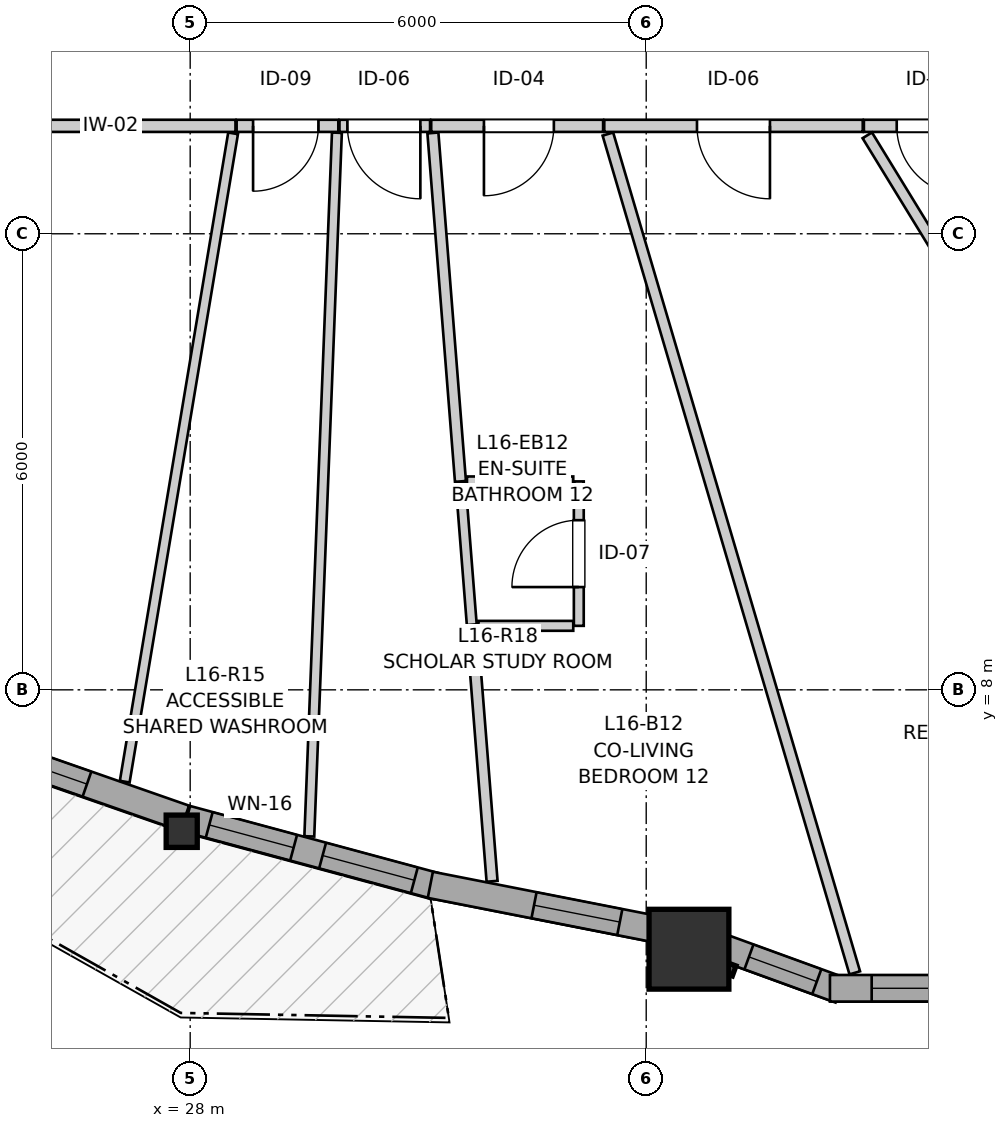
"""IFC4 building model, lengths in metres.
Left out: names, types, materials, properties, quantities, classifications, styles, units other than length and angle.
Written with IfcOpenShell. Run it as: python <this file> out.ifc"""

import sys

from ifc_helpers import new_model, si_unit, direction, frame, frame_2d, origin, origin_2d, place, context, subcontext, project, spatial, rectangle, i_section, extrude, source, transform, mapped, element, fill, save


model = new_model("IFC4")
c1 = context("Model", 3, precision=1e-05, world=origin(), true_north=direction((0.0, 1.0)))
c2 = subcontext(c1, "Body", "Model", "MODEL_VIEW")
j1 = project(units=[si_unit("LENGTHUNIT", "METRE"), si_unit("PLANEANGLEUNIT", "RADIAN")], contexts=[c1])
p1 = place(None, origin())
s1 = spatial("IfcSite", under=j1, at=p1, CompositionType="ELEMENT")
p2 = place(p1, origin())
s2 = spatial("IfcBuilding", under=s1, at=p2, CompositionType="ELEMENT")
p3 = place(p2, frame((0.0, 0.0, 55.8)))
s3 = spatial("IfcBuildingStorey", under=s2, at=p3, CompositionType="ELEMENT", Elevation=55.8)
m1 = source(origin(), c2, "Body", "SweptSolid", [
    extrude(i_section(OverallWidth=0.409, OverallDepth=0.425, WebThickness=0.03, FlangeThickness=0.048, FilletRadius=0.015, at=origin_2d()), origin(), (0.0, 0.0, 1.0), 2.94),
])
p4 = place(p3, frame((27.888, 6.139, 0.0), z_axis=(0.0, 0.0, 1.0), x_axis=(1.0, 0.0, 0.0)))
e1 = element("IfcColumn", 1, at=p4, inside=s3, PredefinedType="PILASTER", context=c2, shape_type="MappedRepresentation", body=[
    mapped(m1, transform((0.0, 0.0, 0.0), x_axis=(1.0, 0.0, 0.0), y_axis=(0.0, 1.0, 0.0), z_axis=(0.0, 0.0, 1.0), scale=1.0)),
])
m2 = source(origin(), c2, "Body", "SweptSolid", [
    extrude(rectangle(XDim=1.05, YDim=1.05, at=origin_2d()), origin(), (0.0, 0.0, 1.0), 2.94),
])
p5 = place(p3, frame((34.562, 4.587, 0.0), z_axis=(0.0, 0.0, 1.0), x_axis=(1.0, 0.0, 0.0)))
e2 = element("IfcColumn", 2, at=p5, inside=s3, PredefinedType="COLUMN", context=c2, shape_type="MappedRepresentation", body=[
    mapped(m2, transform((0.0, 0.0, 0.0), x_axis=(1.0, 0.0, 0.0), y_axis=(0.0, 1.0, 0.0), z_axis=(0.0, 0.0, 1.0), scale=1.0)),
])
p6 = place(p3, frame((24.76, 7.417, 0.0), z_axis=(0.0, 0.0, 1.0), x_axis=(0.944134890247, -0.329559264804, 0.0)))
e3 = element("IfcWall", 3, at=p6, inside=s3, PredefinedType="SOLIDWALL", context=c2, shape_type="SweptSolid", body=[
    extrude(rectangle(XDim=3.354, YDim=0.35, at=frame_2d((1.677, 0.0))), origin(), (0.0, 0.0, 1.0), 2.42),
])
p7 = place(p6, frame((0.543, 0.0, 0.82)))
e4 = element("IfcOpeningElement", 4, at=p7, cuts=e3, PredefinedType="OPENING", context=c2, shape_type="SweptSolid", body=[
    extrude(rectangle(XDim=1.45, YDim=1.25, at=frame_2d((0.725, 0.625))), frame((0.0, 0.185, 0.0), z_axis=(0.0, -1.0, 0.0), x_axis=(1.0, 0.0, 0.0)), (0.0, 0.0, 1.0), 0.37),
])
p8 = place(p3, frame((27.953, 6.303, 0.0), z_axis=(0.0, 0.0, 1.0), x_axis=(0.965464207527, -0.260535724968, 0.0)))
e5 = element("IfcWall", 5, at=p8, inside=s3, PredefinedType="SOLIDWALL", context=c2, shape_type="SweptSolid", body=[
    extrude(rectangle(XDim=3.41, YDim=0.35, at=frame_2d((1.705, 0.0))), origin(), (0.0, 0.0, 1.0), 2.42),
])
p9 = place(p8, frame((0.308, 0.0, 0.82)))
e6 = element("IfcOpeningElement", 6, at=p9, cuts=e5, PredefinedType="OPENING", context=c2, shape_type="SweptSolid", body=[
    extrude(rectangle(XDim=1.15, YDim=1.2, at=frame_2d((0.575, 0.6))), frame((0.0, 0.185, 0.0), z_axis=(0.0, -1.0, 0.0), x_axis=(1.0, 0.0, 0.0)), (0.0, 0.0, 1.0), 0.37),
])
p10 = place(p8, frame((1.853, 0.0, 0.82)))
e7 = element("IfcOpeningElement", 7, at=p10, cuts=e5, PredefinedType="OPENING", context=c2, shape_type="SweptSolid", body=[
    extrude(rectangle(XDim=1.25, YDim=1.35, at=frame_2d((0.625, 0.675))), frame((0.0, 0.185, 0.0), z_axis=(0.0, -1.0, 0.0), x_axis=(1.0, 0.0, 0.0)), (0.0, 0.0, 1.0), 0.37),
])
p11 = place(p3, frame((31.16, 5.435, 0.0), z_axis=(0.0, 0.0, 1.0), x_axis=(0.981237747431, -0.192801667567, 0.0)))
e8 = element("IfcWall", 8, at=p11, inside=s3, PredefinedType="SOLIDWALL", context=c2, shape_type="SweptSolid", body=[
    extrude(rectangle(XDim=3.202, YDim=0.35, at=frame_2d((1.601, 0.0))), origin(), (0.0, 0.0, 1.0), 2.42),
])
p12 = place(p11, frame((1.39, 0.0, 0.82)))
e9 = element("IfcOpeningElement", 9, at=p12, cuts=e8, PredefinedType="OPENING", context=c2, shape_type="SweptSolid", body=[
    extrude(rectangle(XDim=1.15, YDim=1.2, at=frame_2d((0.575, 0.6))), frame((0.0, 0.185, 0.0), z_axis=(0.0, -1.0, 0.0), x_axis=(1.0, 0.0, 0.0)), (0.0, 0.0, 1.0), 0.37),
])
p13 = place(p3, frame((34.904, 4.649, 0.0), z_axis=(0.0, 0.0, 1.0), x_axis=(0.939675390388, -0.342067479745, 0.0)))
e10 = element("IfcWall", 10, at=p13, inside=s3, PredefinedType="SOLIDWALL", context=c2, shape_type="SweptSolid", body=[
    extrude(rectangle(XDim=1.752, YDim=0.35, at=frame_2d((0.876, 0.0))), origin(), (0.0, 0.0, 1.0), 2.42),
])
p14 = place(p13, frame((0.476, 0.0, 0.82)))
e11 = element("IfcOpeningElement", 11, at=p14, cuts=e10, PredefinedType="OPENING", context=c2, shape_type="SweptSolid", body=[
    extrude(rectangle(XDim=0.95, YDim=1.35, at=frame_2d((0.475, 0.675))), frame((0.0, 0.185, 0.0), z_axis=(0.0, -1.0, 0.0), x_axis=(1.0, 0.0, 0.0)), (0.0, 0.0, 1.0), 0.37),
])
p15 = place(p3, frame((36.417, 4.073, 0.0), z_axis=(0.0, 0.0, 1.0), x_axis=(1.0, 0.0, 0.0)))
e12 = element("IfcWall", 12, at=p15, inside=s3, PredefinedType="SOLIDWALL", context=c2, shape_type="SweptSolid", body=[
    extrude(rectangle(XDim=2.091, YDim=0.35, at=frame_2d((1.045, 0.0))), origin(), (0.0, 0.0, 1.0), 2.42),
])
p16 = place(p15, frame((0.549, 0.0, 0.82)))
e13 = element("IfcOpeningElement", 13, at=p16, cuts=e12, PredefinedType="OPENING", context=c2, shape_type="SweptSolid", body=[
    extrude(rectangle(XDim=1.25, YDim=1.35, at=frame_2d((0.625, 0.675))), frame((0.0, 0.185, 0.0), z_axis=(0.0, -1.0, 0.0), x_axis=(1.0, 0.0, 0.0)), (0.0, 0.0, 1.0), 0.37),
])
p17 = place(p3, frame((28.596, 15.42, 0.0), z_axis=(0.0, 0.0, 1.0), x_axis=(-1.0, 0.0, 0.0)))
e14 = element("IfcWall", 14, at=p17, inside=s3, PredefinedType="PARTITIONING", context=c2, shape_type="SweptSolid", body=[
    extrude(rectangle(XDim=6.576, YDim=0.16, at=frame_2d((3.288, 0.0))), origin(), (0.0, 0.0, 1.0), 2.94),
])
p18 = place(p17, frame((2.646, 0.0, 0.0)))
e15 = element("IfcOpeningElement", 15, at=p18, cuts=e14, PredefinedType="OPENING", context=c2, shape_type="SweptSolid", body=[
    extrude(rectangle(XDim=1.3, YDim=2.1, at=frame_2d((0.65, 1.05))), frame((0.0, 0.09, 0.0), z_axis=(0.0, -1.0, 0.0), x_axis=(1.0, 0.0, 0.0)), (0.0, 0.0, 1.0), 0.18),
])
p19 = place(p3, frame((36.849, 15.42, 0.0), z_axis=(0.0, 0.0, 1.0), x_axis=(-1.0, 0.0, 0.0)))
e16 = element("IfcWall", 16, at=p19, inside=s3, PredefinedType="PARTITIONING", context=c2, shape_type="SweptSolid", body=[
    extrude(rectangle(XDim=3.401, YDim=0.16, at=frame_2d((1.701, 0.0))), origin(), (0.0, 0.0, 1.0), 2.94),
])
p20 = place(p19, frame((1.221, 0.0, 0.0)))
e17 = element("IfcOpeningElement", 17, at=p20, cuts=e16, PredefinedType="OPENING", context=c2, shape_type="SweptSolid", body=[
    extrude(rectangle(XDim=0.96, YDim=2.1, at=frame_2d((0.48, 1.05))), frame((0.0, 0.09, 0.0), z_axis=(0.0, -1.0, 0.0), x_axis=(1.0, 0.0, 0.0)), (0.0, 0.0, 1.0), 0.18),
])
p21 = place(p3, frame((33.433, 15.42, 0.0), z_axis=(0.0, 0.0, 1.0), x_axis=(-1.0, 0.0, 0.0)))
e18 = element("IfcWall", 18, at=p21, inside=s3, PredefinedType="PARTITIONING", context=c2, shape_type="SweptSolid", body=[
    extrude(rectangle(XDim=2.262, YDim=0.16, at=frame_2d((1.131, 0.0))), origin(), (0.0, 0.0, 1.0), 2.94),
])
p22 = place(p21, frame((0.648, 0.0, 0.0)))
e19 = element("IfcOpeningElement", 19, at=p22, cuts=e18, PredefinedType="OPENING", context=c2, shape_type="SweptSolid", body=[
    extrude(rectangle(XDim=0.92, YDim=2.1, at=frame_2d((0.46, 1.05))), frame((0.0, 0.09, 0.0), z_axis=(0.0, -1.0, 0.0), x_axis=(1.0, 0.0, 0.0)), (0.0, 0.0, 1.0), 0.18),
])
p23 = place(p3, frame((33.113, 8.842, 0.0), z_axis=(0.0, 0.0, 1.0), x_axis=(0.0, 1.0, 0.0)))
e20 = element("IfcWall", 20, at=p23, inside=s3, PredefinedType="PARTITIONING", context=c2, shape_type="SweptSolid", body=[
    extrude(rectangle(XDim=1.9, YDim=0.13, at=frame_2d((0.95, 0.0))), origin(), (0.0, 0.0, 1.0), 2.308),
])
p24 = place(p23, frame((0.51, 0.0, 0.0)))
e21 = element("IfcOpeningElement", 21, at=p24, cuts=e20, PredefinedType="OPENING", context=c2, shape_type="SweptSolid", body=[
    extrude(rectangle(XDim=0.88, YDim=2.05, at=frame_2d((0.44, 1.025))), frame((0.0, 0.075, 0.0), z_axis=(0.0, -1.0, 0.0), x_axis=(1.0, 0.0, 0.0)), (0.0, 0.0, 1.0), 0.15),
])
p25 = place(p3, frame((38.68, 15.42, 0.0), z_axis=(0.0, 0.0, 1.0), x_axis=(-1.0, 0.0, 0.0)))
e22 = element("IfcWall", 22, at=p25, inside=s3, PredefinedType="PARTITIONING", context=c2, shape_type="SweptSolid", body=[
    extrude(rectangle(XDim=1.816, YDim=0.16, at=frame_2d((0.908, 0.0))), origin(), (0.0, 0.0, 1.0), 2.94),
])
p26 = place(p25, frame((0.464, 0.0, 0.0)))
e23 = element("IfcOpeningElement", 23, at=p26, cuts=e22, PredefinedType="OPENING", context=c2, shape_type="SweptSolid", body=[
    extrude(rectangle(XDim=0.92, YDim=2.1, at=frame_2d((0.46, 1.05))), frame((0.0, 0.09, 0.0), z_axis=(0.0, -1.0, 0.0), x_axis=(1.0, 0.0, 0.0)), (0.0, 0.0, 1.0), 0.18),
])
p27 = place(p3, frame((29.949, 15.42, 0.0), z_axis=(0.0, 0.0, 1.0), x_axis=(-1.0, 0.0, 0.0)))
e24 = element("IfcWall", 24, at=p27, inside=s3, PredefinedType="PARTITIONING", context=c2, shape_type="SweptSolid", body=[
    extrude(rectangle(XDim=1.338, YDim=0.16, at=frame_2d((0.669, 0.0))), origin(), (0.0, 0.0, 1.0), 2.94),
])
p28 = place(p27, frame((0.261, 0.0, 0.0)))
e25 = element("IfcOpeningElement", 25, at=p28, cuts=e24, PredefinedType="OPENING", context=c2, shape_type="SweptSolid", body=[
    extrude(rectangle(XDim=0.86, YDim=2.05, at=frame_2d((0.43, 1.025))), frame((0.0, 0.09, 0.0), z_axis=(0.0, -1.0, 0.0), x_axis=(1.0, 0.0, 0.0)), (0.0, 0.0, 1.0), 0.18),
])
p29 = place(p3, frame((31.156, 15.42, 0.0), z_axis=(0.0, 0.0, 1.0), x_axis=(-1.0, 0.0, 0.0)))
e26 = element("IfcWall", 26, at=p29, inside=s3, PredefinedType="PARTITIONING", context=c2, shape_type="SweptSolid", body=[
    extrude(rectangle(XDim=1.192, YDim=0.16, at=frame_2d((0.596, 0.0))), origin(), (0.0, 0.0, 1.0), 2.94),
])
p30 = place(p29, frame((0.128, 0.0, 0.0)))
e27 = element("IfcOpeningElement", 27, at=p30, cuts=e26, PredefinedType="OPENING", context=c2, shape_type="SweptSolid", body=[
    extrude(rectangle(XDim=0.96, YDim=2.1, at=frame_2d((0.48, 1.05))), frame((0.0, 0.09, 0.0), z_axis=(0.0, -1.0, 0.0), x_axis=(1.0, 0.0, 0.0)), (0.0, 0.0, 1.0), 0.18),
])
p31 = place(p3, frame((33.496, 15.312, 0.0), z_axis=(0.0, 0.0, 1.0), x_axis=(0.282353610079, -0.959310397564, 0.0)))
e28 = element("IfcWall", 28, at=p31, inside=s3, PredefinedType="PARTITIONING", context=c2, shape_type="SweptSolid", body=[
    extrude(rectangle(XDim=11.503, YDim=0.145, at=frame_2d((5.752, 0.0))), origin(), (0.0, 0.0, 1.0), 2.94),
])
p32 = place(p3, frame((36.908, 15.295, 0.0), z_axis=(0.0, 0.0, 1.0), x_axis=(0.522407183079, -0.852696156358, 0.0)))
e29 = element("IfcWall", 29, at=p32, inside=s3, PredefinedType="PARTITIONING", context=c2, shape_type="SweptSolid", body=[
    extrude(rectangle(XDim=9.87, YDim=0.145, at=frame_2d((4.935, 0.0))), origin(), (0.0, 0.0, 1.0), 2.94),
])
p33 = place(p3, frame((29.567, 6.072, 0.0), z_axis=(0.0, 0.0, 1.0), x_axis=(0.039185050788, 0.999231970963, 0.0)))
e30 = element("IfcWall", 30, at=p33, inside=s3, PredefinedType="PARTITIONING", context=c2, shape_type="SweptSolid", body=[
    extrude(rectangle(XDim=9.265, YDim=0.13, at=frame_2d((4.632, 0.0))), origin(), (0.0, 0.0, 1.0), 2.94),
])
p34 = place(p3, frame((27.139, 6.792, 0.0), z_axis=(0.0, 0.0, 1.0), x_axis=(0.164847632872, 0.986319044699, 0.0)))
e31 = element("IfcWall", 31, at=p34, inside=s3, PredefinedType="PARTITIONING", context=c2, shape_type="SweptSolid", body=[
    extrude(rectangle(XDim=8.648, YDim=0.13, at=frame_2d((4.324, 0.0))), origin(), (0.0, 0.0, 1.0), 2.94),
])
p35 = place(p3, frame((31.193, 15.326, 0.0), z_axis=(0.0, 0.0, 1.0), x_axis=(0.078835771191, -0.996887617127, 0.0)))
e32 = element("IfcWall", 32, at=p35, inside=s3, PredefinedType="PARTITIONING", context=c2, shape_type="SweptSolid", body=[
    extrude(rectangle(XDim=4.599, YDim=0.145, at=frame_2d((2.299, 0.0))), origin(), (0.0, 0.0, 1.0), 2.94),
])
p36 = place(p3, frame((31.706, 8.842, 0.0), z_axis=(0.0, 0.0, 1.0), x_axis=(0.078861571463, -0.996885576456, 0.0)))
e33 = element("IfcWall", 33, at=p36, inside=s3, PredefinedType="PARTITIONING", context=c2, shape_type="SweptSolid", body=[
    extrude(rectangle(XDim=3.371, YDim=0.145, at=frame_2d((1.686, 0.0))), origin(), (0.0, 0.0, 1.0), 2.94),
])
p37 = place(p3, frame((31.557, 10.727, 0.0), z_axis=(0.0, 0.0, 1.0), x_axis=(0.078736521399, -0.996895461018, 0.0)))
e34 = element("IfcWall", 34, at=p37, inside=s3, PredefinedType="PARTITIONING", context=c2, shape_type="SweptSolid", body=[
    extrude(rectangle(XDim=1.876, YDim=0.13, at=frame_2d((0.938, 0.0))), origin(), (0.0, 0.0, 1.0), 2.94),
])
p38 = place(p3, frame((31.642, 10.742, 0.0), z_axis=(0.0, 0.0, 1.0), x_axis=(1.0, 0.0, 0.0)))
e35 = element("IfcWall", 35, at=p38, inside=s3, PredefinedType="PARTITIONING", context=c2, shape_type="SweptSolid", body=[
    extrude(rectangle(XDim=1.398, YDim=0.13, at=frame_2d((0.699, 0.0))), origin(), (0.0, 0.0, 1.0), 2.94),
])
p39 = place(p3, frame((31.792, 8.842, 0.0), z_axis=(0.0, 0.0, 1.0), x_axis=(1.0, 0.0, 0.0)))
e36 = element("IfcWall", 36, at=p39, inside=s3, PredefinedType="PARTITIONING", context=c2, shape_type="SweptSolid", body=[
    extrude(rectangle(XDim=1.248, YDim=0.13, at=frame_2d((0.624, 0.0))), origin(), (0.0, 0.0, 1.0), 2.508),
])
m3 = source(origin(), c2, "Body", "SweptSolid", [
    extrude(rectangle(XDim=1.45, YDim=1.25, at=frame_2d((0.725, 0.625))), frame((0.0, 0.03, 0.0), z_axis=(0.0, -1.0, 0.0), x_axis=(1.0, 0.0, 0.0)), (0.0, 0.0, 1.0), 0.06),
])
p40 = place(p7, origin())
e37 = element("IfcWindow", 37, at=p40, inside=s3, PartitioningType="SINGLE_PANEL", PredefinedType="WINDOW", context=c2, shape_type="MappedRepresentation", body=[
    mapped(m3, transform((0.0, 0.0, 0.0), x_axis=(1.0, 0.0, 0.0), y_axis=(0.0, 1.0, 0.0), z_axis=(0.0, 0.0, 1.0), scale=1.0)),
])
fill(e4, e37)
m4 = source(origin(), c2, "Body", "SweptSolid", [
    extrude(rectangle(XDim=1.15, YDim=1.2, at=frame_2d((0.575, 0.6))), frame((0.0, 0.03, 0.0), z_axis=(0.0, -1.0, 0.0), x_axis=(1.0, 0.0, 0.0)), (0.0, 0.0, 1.0), 0.06),
])
p41 = place(p9, origin())
e38 = element("IfcWindow", 38, at=p41, inside=s3, PartitioningType="SINGLE_PANEL", PredefinedType="WINDOW", context=c2, shape_type="MappedRepresentation", body=[
    mapped(m4, transform((0.0, 0.0, 0.0), x_axis=(1.0, 0.0, 0.0), y_axis=(0.0, 1.0, 0.0), z_axis=(0.0, 0.0, 1.0), scale=1.0)),
])
fill(e6, e38)
m5 = source(origin(), c2, "Body", "SweptSolid", [
    extrude(rectangle(XDim=1.25, YDim=1.35, at=frame_2d((0.625, 0.675))), frame((0.0, 0.03, 0.0), z_axis=(0.0, -1.0, 0.0), x_axis=(1.0, 0.0, 0.0)), (0.0, 0.0, 1.0), 0.06),
])
p42 = place(p10, origin())
e39 = element("IfcWindow", 39, at=p42, inside=s3, PartitioningType="SINGLE_PANEL", PredefinedType="WINDOW", context=c2, shape_type="MappedRepresentation", body=[
    mapped(m5, transform((0.0, 0.0, 0.0), x_axis=(1.0, 0.0, 0.0), y_axis=(0.0, 1.0, 0.0), z_axis=(0.0, 0.0, 1.0), scale=1.0)),
])
fill(e7, e39)
p43 = place(p12, origin())
e40 = element("IfcWindow", 40, at=p43, inside=s3, PartitioningType="SINGLE_PANEL", PredefinedType="WINDOW", context=c2, shape_type="MappedRepresentation", body=[
    mapped(m4, transform((0.0, 0.0, 0.0), x_axis=(1.0, 0.0, 0.0), y_axis=(0.0, 1.0, 0.0), z_axis=(0.0, 0.0, 1.0), scale=1.0)),
])
fill(e9, e40)
m6 = source(origin(), c2, "Body", "SweptSolid", [
    extrude(rectangle(XDim=0.95, YDim=1.35, at=frame_2d((0.475, 0.675))), frame((0.0, 0.03, 0.0), z_axis=(0.0, -1.0, 0.0), x_axis=(1.0, 0.0, 0.0)), (0.0, 0.0, 1.0), 0.06),
])
p44 = place(p14, origin())
e41 = element("IfcWindow", 41, at=p44, inside=s3, PartitioningType="SINGLE_PANEL", PredefinedType="WINDOW", context=c2, shape_type="MappedRepresentation", body=[
    mapped(m6, transform((0.0, 0.0, 0.0), x_axis=(1.0, 0.0, 0.0), y_axis=(0.0, 1.0, 0.0), z_axis=(0.0, 0.0, 1.0), scale=1.0)),
])
fill(e11, e41)
p45 = place(p16, origin())
e42 = element("IfcWindow", 42, at=p45, inside=s3, PartitioningType="SINGLE_PANEL", PredefinedType="WINDOW", context=c2, shape_type="MappedRepresentation", body=[
    mapped(m5, transform((0.0, 0.0, 0.0), x_axis=(1.0, 0.0, 0.0), y_axis=(0.0, 1.0, 0.0), z_axis=(0.0, 0.0, 1.0), scale=1.0)),
])
fill(e13, e42)
m7 = source(origin(), c2, "Body", "SweptSolid", [
    extrude(rectangle(XDim=0.96, YDim=2.1, at=frame_2d((0.48, 1.05))), frame((0.0, 0.025, 0.0), z_axis=(0.0, -1.0, 0.0), x_axis=(1.0, 0.0, 0.0)), (0.0, 0.0, 1.0), 0.05),
])
p46 = place(p20, origin())
e43 = element("IfcDoor", 43, at=p46, inside=s3, OperationType="SINGLE_SWING_LEFT", PredefinedType="DOOR", context=c2, shape_type="MappedRepresentation", body=[
    mapped(m7, transform((0.0, 0.0, 0.0), x_axis=(1.0, 0.0, 0.0), y_axis=(0.0, 1.0, 0.0), z_axis=(0.0, 0.0, 1.0), scale=1.0)),
])
fill(e17, e43)
m8 = source(origin(), c2, "Body", "SweptSolid", [
    extrude(rectangle(XDim=0.92, YDim=2.1, at=frame_2d((0.46, 1.05))), frame((0.0, 0.025, 0.0), z_axis=(0.0, -1.0, 0.0), x_axis=(1.0, 0.0, 0.0)), (0.0, 0.0, 1.0), 0.05),
])
p47 = place(p22, origin())
e44 = element("IfcDoor", 44, at=p47, inside=s3, OperationType="SINGLE_SWING_RIGHT", PredefinedType="DOOR", context=c2, shape_type="MappedRepresentation", body=[
    mapped(m8, transform((0.0, 0.0, 0.0), x_axis=(1.0, 0.0, 0.0), y_axis=(0.0, 1.0, 0.0), z_axis=(0.0, 0.0, 1.0), scale=1.0)),
])
fill(e19, e44)
m9 = source(origin(), c2, "Body", "SweptSolid", [
    extrude(rectangle(XDim=0.88, YDim=2.05, at=frame_2d((0.44, 1.025))), frame((0.0, 0.025, 0.0), z_axis=(0.0, -1.0, 0.0), x_axis=(1.0, 0.0, 0.0)), (0.0, 0.0, 1.0), 0.05),
])
p48 = place(p24, origin())
e45 = element("IfcDoor", 45, at=p48, inside=s3, OperationType="SINGLE_SWING_LEFT", PredefinedType="DOOR", context=c2, shape_type="MappedRepresentation", body=[
    mapped(m9, transform((0.0, 0.0, 0.0), x_axis=(1.0, 0.0, 0.0), y_axis=(0.0, 1.0, 0.0), z_axis=(0.0, 0.0, 1.0), scale=1.0)),
])
fill(e21, e45)
p49 = place(p26, origin())
e46 = element("IfcDoor", 46, at=p49, inside=s3, OperationType="SINGLE_SWING_LEFT", PredefinedType="DOOR", context=c2, shape_type="MappedRepresentation", body=[
    mapped(m8, transform((0.0, 0.0, 0.0), x_axis=(1.0, 0.0, 0.0), y_axis=(0.0, 1.0, 0.0), z_axis=(0.0, 0.0, 1.0), scale=1.0)),
])
fill(e23, e46)
m10 = source(origin(), c2, "Body", "SweptSolid", [
    extrude(rectangle(XDim=0.86, YDim=2.05, at=frame_2d((0.43, 1.025))), frame((0.0, 0.025, 0.0), z_axis=(0.0, -1.0, 0.0), x_axis=(1.0, 0.0, 0.0)), (0.0, 0.0, 1.0), 0.05),
])
p50 = place(p28, origin())
e47 = element("IfcDoor", 47, at=p50, inside=s3, OperationType="SINGLE_SWING_RIGHT", PredefinedType="DOOR", context=c2, shape_type="MappedRepresentation", body=[
    mapped(m10, transform((0.0, 0.0, 0.0), x_axis=(1.0, 0.0, 0.0), y_axis=(0.0, 1.0, 0.0), z_axis=(0.0, 0.0, 1.0), scale=1.0)),
])
fill(e25, e47)
p51 = place(p30, origin())
e48 = element("IfcDoor", 48, at=p51, inside=s3, OperationType="SINGLE_SWING_LEFT", PredefinedType="DOOR", context=c2, shape_type="MappedRepresentation", body=[
    mapped(m7, transform((0.0, 0.0, 0.0), x_axis=(1.0, 0.0, 0.0), y_axis=(0.0, 1.0, 0.0), z_axis=(0.0, 0.0, 1.0), scale=1.0)),
])
fill(e27, e48)
save(model, sys.argv[1])
